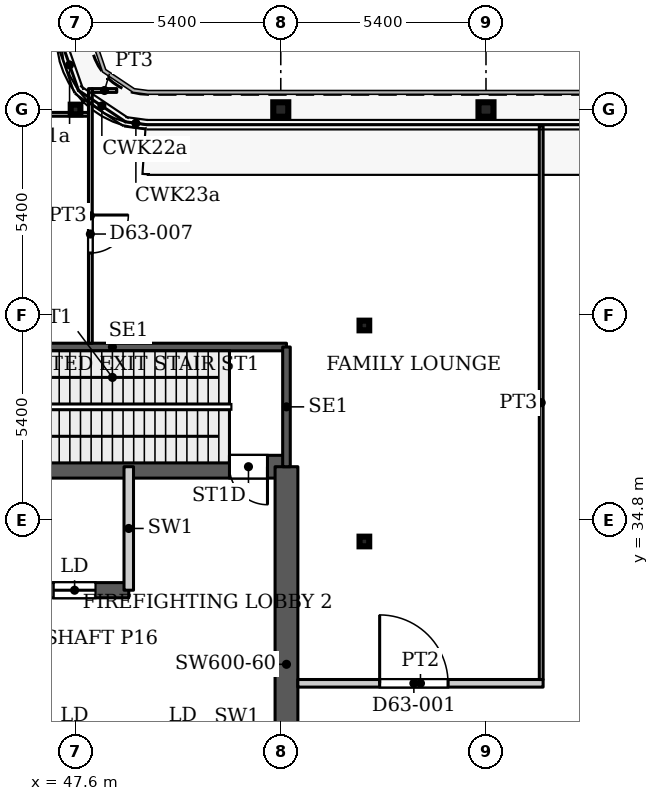
"""IFC4 building model, lengths in metres.
Left out: names, types, materials, properties, quantities, classifications, styles, units other than length and angle.
Written with IfcOpenShell. Run it as: python <this file> out.ifc"""

import sys

from ifc_helpers import new_model, si_unit, direction, frame, frame_2d, origin, origin_2d, place, context, subcontext, project, spatial, rectangle, hollow_rectangle, i_section, extrude, source, transform, mapped, element, fill, save


model = new_model("IFC4")
c1 = context("Model", 3, precision=1e-05, world=origin(), true_north=direction((0.0, 1.0)))
c2 = subcontext(c1, "Body", "Model", "MODEL_VIEW")
j1 = project(units=[si_unit("LENGTHUNIT", "METRE"), si_unit("PLANEANGLEUNIT", "RADIAN")], contexts=[c1])
p1 = place(None, origin())
s1 = spatial("IfcSite", under=j1, at=p1, CompositionType="ELEMENT")
p2 = place(p1, origin())
s2 = spatial("IfcBuilding", under=s1, at=p2, CompositionType="ELEMENT")
p3 = place(p2, frame((0.0, 0.0, 266.9)))
s3 = spatial("IfcBuildingStorey", under=s2, at=p3, CompositionType="ELEMENT", Elevation=266.9)
for number, where, z_axis, x_axis in (
    (1, (53.0, 45.6, 0.0), (0.0, 0.0, 1.0), (1.0, 0.0, 0.0)),
    (2, (58.4, 45.6, 0.0), (0.0, 0.0, 1.0), (1.0, 0.0, 0.0)),
):
    element("IfcColumn", number, at=place(p3, frame(where, z_axis=z_axis, x_axis=x_axis)), inside=s3, PredefinedType="COLUMN", context=c2, shape_type="SweptSolid", body=[
        extrude(i_section(OverallWidth=0.395, OverallDepth=0.38, WebThickness=0.019, FlangeThickness=0.03, FilletRadius=0.011, at=origin_2d()), origin(), (0.0, 0.0, 1.0), 7.8),
    ])
for number, where, z_axis, x_axis in (
    (3, (55.2, 34.232, 0.0), (0.0, 0.0, 1.0), (1.0, 0.0, 0.0)),
    (4, (55.2, 39.916, 0.0), (0.0, 0.0, 1.0), (1.0, 0.0, 0.0)),
    (5, (47.6, 45.6, 0.0), (0.0, 0.0, 1.0), (1.0, 0.0, 0.0)),
):
    element("IfcColumn", number, at=place(p3, frame(where, z_axis=z_axis, x_axis=x_axis)), inside=s3, PredefinedType="COLUMN", context=c2, shape_type="SweptSolid", body=[
        extrude(hollow_rectangle(XDim=0.254, YDim=0.254, WallThickness=0.013, InnerFilletRadius=0.013, OuterFilletRadius=0.025, at=origin_2d()), origin(), (0.0, 0.0, 1.0), 7.8),
    ])
p4 = place(p3, frame((34.75, 32.95, 0.0), z_axis=(0.0, 0.0, 1.0), x_axis=(1.0, 0.0, 0.0)))
e6 = element("IfcWall", 6, at=p4, inside=s3, PredefinedType="SHEAR", context=c2, shape_type="SweptSolid", body=[
    extrude(rectangle(XDim=14.25, YDim=0.4, at=frame_2d((7.125, 0.0))), origin(), (0.0, 0.0, 1.0), 7.8),
])
p5 = place(p4, frame((0.875, 0.0, 0.0)))
e7 = element("IfcOpeningElement", 7, at=p5, cuts=e6, PredefinedType="OPENING", context=c2, shape_type="SweptSolid", body=[
    extrude(rectangle(XDim=1.1, YDim=2.2, at=frame_2d((0.55, 1.1))), frame((0.0, 0.21, 0.0), z_axis=(0.0, -1.0, 0.0), x_axis=(1.0, 0.0, 0.0)), (0.0, 0.0, 1.0), 0.42),
])
p6 = place(p4, frame((3.725, 0.0, 0.0)))
e8 = element("IfcOpeningElement", 8, at=p6, cuts=e6, PredefinedType="OPENING", context=c2, shape_type="SweptSolid", body=[
    extrude(rectangle(XDim=1.1, YDim=2.2, at=frame_2d((0.55, 1.1))), frame((0.0, 0.21, 0.0), z_axis=(0.0, -1.0, 0.0), x_axis=(1.0, 0.0, 0.0)), (0.0, 0.0, 1.0), 0.42),
])
p7 = place(p4, frame((6.575, 0.0, 0.0)))
e9 = element("IfcOpeningElement", 9, at=p7, cuts=e6, PredefinedType="OPENING", context=c2, shape_type="SweptSolid", body=[
    extrude(rectangle(XDim=1.1, YDim=2.2, at=frame_2d((0.55, 1.1))), frame((0.0, 0.21, 0.0), z_axis=(0.0, -1.0, 0.0), x_axis=(1.0, 0.0, 0.0)), (0.0, 0.0, 1.0), 0.42),
])
p8 = place(p4, frame((9.425, 0.0, 0.0)))
e10 = element("IfcOpeningElement", 10, at=p8, cuts=e6, PredefinedType="OPENING", context=c2, shape_type="SweptSolid", body=[
    extrude(rectangle(XDim=1.1, YDim=2.2, at=frame_2d((0.55, 1.1))), frame((0.0, 0.21, 0.0), z_axis=(0.0, -1.0, 0.0), x_axis=(1.0, 0.0, 0.0)), (0.0, 0.0, 1.0), 0.42),
])
p9 = place(p4, frame((12.275, 0.0, 0.0)))
e11 = element("IfcOpeningElement", 11, at=p9, cuts=e6, PredefinedType="OPENING", context=c2, shape_type="SweptSolid", body=[
    extrude(rectangle(XDim=1.1, YDim=2.2, at=frame_2d((0.55, 1.1))), frame((0.0, 0.21, 0.0), z_axis=(0.0, -1.0, 0.0), x_axis=(1.0, 0.0, 0.0)), (0.0, 0.0, 1.0), 0.42),
])
p10 = place(p3, frame((34.75, 36.2, 0.0), z_axis=(0.0, 0.0, 1.0), x_axis=(1.0, 0.0, 0.0)))
e12 = element("IfcWall", 12, at=p10, inside=s3, PredefinedType="SHEAR", context=c2, shape_type="SweptSolid", body=[
    extrude(rectangle(XDim=18.4, YDim=0.6, at=frame_2d((9.2, 0.0))), origin(), (0.0, 0.0, 1.0), 7.8),
])
p11 = place(p10, frame((16.9, 0.0, 0.0)))
e13 = element("IfcOpeningElement", 13, at=p11, cuts=e12, PredefinedType="OPENING", context=c2, shape_type="SweptSolid", body=[
    extrude(rectangle(XDim=1.0, YDim=2.2, at=frame_2d((0.5, 1.1))), frame((0.0, 0.31, 0.0), z_axis=(0.0, -1.0, 0.0), x_axis=(1.0, 0.0, 0.0)), (0.0, 0.0, 1.0), 0.62),
])
p12 = place(p3, frame((53.15, 25.8, 0.0), z_axis=(0.0, 0.0, 1.0), x_axis=(0.0, 1.0, 0.0)))
e14 = element("IfcWall", 14, at=p12, inside=s3, PredefinedType="SHEAR", context=c2, shape_type="SweptSolid", body=[
    extrude(rectangle(XDim=10.4, YDim=0.6, at=frame_2d((5.2, 0.0))), origin(), (0.0, 0.0, 1.0), 7.8),
])
p13 = place(p12, frame((0.8, 0.0, 0.0)))
e15 = element("IfcOpeningElement", 15, at=p13, cuts=e14, PredefinedType="OPENING", context=c2, shape_type="SweptSolid", body=[
    extrude(rectangle(XDim=0.9, YDim=2.2, at=frame_2d((0.45, 1.1))), frame((0.0, 0.31, 0.0), z_axis=(0.0, -1.0, 0.0), x_axis=(1.0, 0.0, 0.0)), (0.0, 0.0, 1.0), 0.62),
])
p14 = place(p3, frame((43.99, 39.35, 0.0), z_axis=(0.0, 0.0, 1.0), x_axis=(1.0, 0.0, 0.0)))
e16 = element("IfcWall", 16, at=p14, inside=s3, PredefinedType="SHEAR", context=c2, shape_type="SweptSolid", body=[
    extrude(rectangle(XDim=9.16, YDim=0.2, at=frame_2d((4.58, 0.0))), origin(), (0.0, 0.0, 1.0), 7.8),
])
p15 = place(p3, frame((53.15, 36.2, 0.0), z_axis=(0.0, 0.0, 1.0), x_axis=(0.0, 1.0, 0.0)))
e17 = element("IfcWall", 17, at=p15, inside=s3, PredefinedType="SHEAR", context=c2, shape_type="SweptSolid", body=[
    extrude(rectangle(XDim=3.15, YDim=0.2, at=frame_2d((1.575, 0.0))), origin(), (0.0, 0.0, 1.0), 7.8),
])
p16 = place(p3, frame((49.0, 32.95, 0.0), z_axis=(0.0, 0.0, 1.0), x_axis=(0.0, 1.0, 0.0)))
e18 = element("IfcWall", 18, at=p16, inside=s3, PredefinedType="PARTITIONING", context=c2, shape_type="SweptSolid", body=[
    extrude(rectangle(XDim=3.25, YDim=0.25, at=frame_2d((1.625, 0.0))), origin(), (0.0, 0.0, 1.0), 7.8),
])
p17 = place(p3, frame((37.999, 45.473, 0.0), z_axis=(0.0, 0.0, 1.0), x_axis=(1.0, 0.0, 0.0)))
e19 = element("IfcWall", 19, at=p17, inside=s3, PredefinedType="PARTITIONING", context=c2, shape_type="SweptSolid", body=[
    extrude(rectangle(XDim=9.941, YDim=0.1, at=frame_2d((4.97, 0.0))), origin(), (0.0, 0.0, 1.0), 7.5),
])
p18 = place(p17, frame((4.551, 0.0, 0.0)))
e20 = element("IfcOpeningElement", 20, at=p18, cuts=e19, PredefinedType="OPENING", context=c2, shape_type="SweptSolid", body=[
    extrude(rectangle(XDim=1.0, YDim=2.1, at=frame_2d((0.5, 1.05))), frame((0.0, 0.06, 0.0), z_axis=(0.0, -1.0, 0.0), x_axis=(1.0, 0.0, 0.0)), (0.0, 0.0, 1.0), 0.12),
])
p19 = place(p3, frame((47.99, 39.449, 0.0), z_axis=(0.0, 0.0, 1.0), x_axis=(0.0, 1.0, 0.0)))
e21 = element("IfcWall", 21, at=p19, inside=s3, PredefinedType="PARTITIONING", context=c2, shape_type="SweptSolid", body=[
    extrude(rectangle(XDim=6.701, YDim=0.1, at=frame_2d((3.351, 0.0))), origin(), (0.0, 0.0, 1.0), 7.5),
])
p20 = place(p19, frame((2.374, 0.0, 0.0)))
e22 = element("IfcOpeningElement", 22, at=p20, cuts=e21, PredefinedType="OPENING", context=c2, shape_type="SweptSolid", body=[
    extrude(rectangle(XDim=1.0, YDim=2.1, at=frame_2d((0.5, 1.05))), frame((0.0, 0.06, 0.0), z_axis=(0.0, -1.0, 0.0), x_axis=(1.0, 0.0, 0.0)), (0.0, 0.0, 1.0), 0.12),
])
p21 = place(p3, frame((48.04, 46.1, 0.0), z_axis=(0.0, 0.0, 1.0), x_axis=(1.0, 0.0, 0.0)))
e23 = element("IfcWall", 23, at=p21, inside=s3, PredefinedType="PARTITIONING", context=c2, shape_type="SweptSolid", body=[
    extrude(rectangle(XDim=0.644, YDim=0.1, at=frame_2d((0.322, 0.0))), origin(), (0.0, 0.0, 1.0), 7.5),
])
p22 = place(p3, frame((53.449, 30.5, 0.0), z_axis=(0.0, 0.0, 1.0), x_axis=(1.0, 0.0, 0.0)))
e24 = element("IfcWall", 24, at=p22, inside=s3, PredefinedType="PARTITIONING", context=c2, shape_type="SweptSolid", body=[
    extrude(rectangle(XDim=6.454, YDim=0.2, at=frame_2d((3.227, 0.0))), origin(), (0.0, 0.0, 1.0), 7.5),
])
p23 = place(p22, frame((2.153, 0.0, 0.0)))
e25 = element("IfcOpeningElement", 25, at=p23, cuts=e24, PredefinedType="OPENING", context=c2, shape_type="SweptSolid", body=[
    extrude(rectangle(XDim=1.8, YDim=2.1, at=frame_2d((0.9, 1.05))), frame((0.0, 0.11, 0.0), z_axis=(0.0, -1.0, 0.0), x_axis=(1.0, 0.0, 0.0)), (0.0, 0.0, 1.0), 0.22),
])
p24 = place(p3, frame((59.853, 30.6, 0.0), z_axis=(0.0, 0.0, 1.0), x_axis=(0.0, 1.0, 0.0)))
e26 = element("IfcWall", 26, at=p24, inside=s3, PredefinedType="PARTITIONING", context=c2, shape_type="SweptSolid", body=[
    extrude(rectangle(XDim=14.57, YDim=0.1, at=frame_2d((7.285, 0.0))), origin(), (0.0, 0.0, 1.0), 7.5),
])
m1 = source(origin(), c2, "Body", "SweptSolid", [
    extrude(rectangle(XDim=1.1, YDim=2.2, at=frame_2d((0.55, 1.1))), frame((0.0, 0.025, 0.0), z_axis=(0.0, -1.0, 0.0), x_axis=(1.0, 0.0, 0.0)), (0.0, 0.0, 1.0), 0.05),
])
p25 = place(p9, origin())
e27 = element("IfcDoor", 27, at=p25, inside=s3, OperationType="SLIDING_TO_LEFT", PredefinedType="DOOR", context=c2, shape_type="MappedRepresentation", body=[
    mapped(m1, transform((0.0, 0.0, 0.0), x_axis=(1.0, 0.0, 0.0), y_axis=(0.0, 1.0, 0.0), z_axis=(0.0, 0.0, 1.0), scale=1.0)),
])
fill(e11, e27)
m2 = source(origin(), c2, "Body", "SweptSolid", [
    extrude(rectangle(XDim=1.0, YDim=2.2, at=frame_2d((0.5, 1.1))), frame((0.0, 0.025, 0.0), z_axis=(0.0, -1.0, 0.0), x_axis=(1.0, 0.0, 0.0)), (0.0, 0.0, 1.0), 0.05),
])
p26 = place(p11, origin())
e28 = element("IfcDoor", 28, at=p26, inside=s3, OperationType="SINGLE_SWING_RIGHT", PredefinedType="DOOR", context=c2, shape_type="MappedRepresentation", body=[
    mapped(m2, transform((0.0, 0.0, 0.0), x_axis=(1.0, 0.0, 0.0), y_axis=(0.0, 1.0, 0.0), z_axis=(0.0, 0.0, 1.0), scale=1.0)),
])
fill(e13, e28)
m3 = source(origin(), c2, "Body", "SweptSolid", [
    extrude(rectangle(XDim=1.8, YDim=2.1, at=frame_2d((0.9, 1.05))), frame((0.0, 0.025, 0.0), z_axis=(0.0, -1.0, 0.0), x_axis=(1.0, 0.0, 0.0)), (0.0, 0.0, 1.0), 0.05),
])
p27 = place(p23, origin())
e29 = element("IfcDoor", 29, at=p27, inside=s3, OperationType="DOUBLE_DOOR_SINGLE_SWING", PredefinedType="DOOR", context=c2, shape_type="MappedRepresentation", body=[
    mapped(m3, transform((0.0, 0.0, 0.0), x_axis=(1.0, 0.0, 0.0), y_axis=(0.0, 1.0, 0.0), z_axis=(0.0, 0.0, 1.0), scale=1.0)),
])
fill(e25, e29)
m4 = source(origin(), c2, "Body", "SweptSolid", [
    extrude(rectangle(XDim=1.0, YDim=2.1, at=frame_2d((0.5, 1.05))), frame((0.0, 0.025, 0.0), z_axis=(0.0, -1.0, 0.0), x_axis=(1.0, 0.0, 0.0)), (0.0, 0.0, 1.0), 0.05),
])
p28 = place(p20, origin())
e30 = element("IfcDoor", 30, at=p28, inside=s3, OperationType="SINGLE_SWING_RIGHT", PredefinedType="DOOR", context=c2, shape_type="MappedRepresentation", body=[
    mapped(m4, transform((0.0, 0.0, 0.0), x_axis=(1.0, 0.0, 0.0), y_axis=(0.0, 1.0, 0.0), z_axis=(0.0, 0.0, 1.0), scale=1.0)),
])
fill(e22, e30)
save(model, sys.argv[1])
